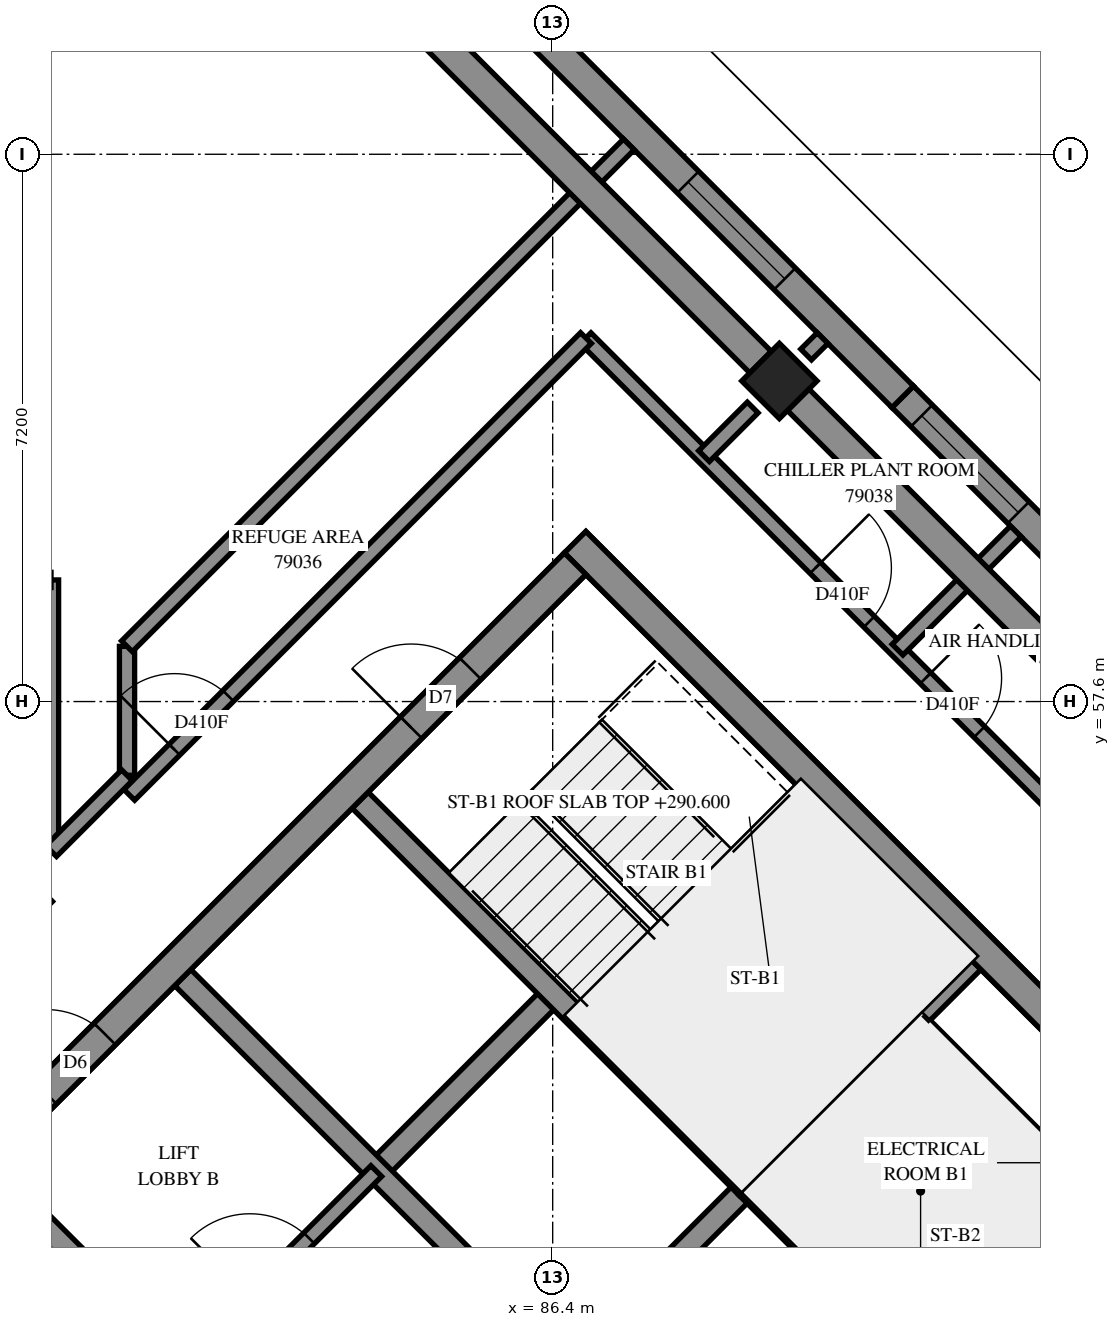
"""IFC4 building model, lengths in metres.
Left out: names, types, materials, properties, quantities, classifications, styles, units other than length and angle.
Written with IfcOpenShell. Run it as: python <this file> out.ifc"""

import sys

from ifc_helpers import new_model, si_unit, direction, frame, frame_2d, origin, origin_2d, place, context, subcontext, project, spatial, polyline, rectangle, outline, extrude, element, fill, save


model = new_model("IFC4")
c1 = context("Model", 3, precision=1e-05, world=origin(), true_north=direction((0.0, 1.0)))
c2 = subcontext(c1, "Body", "Model", "MODEL_VIEW")
j1 = project(units=[si_unit("LENGTHUNIT", "METRE"), si_unit("PLANEANGLEUNIT", "RADIAN")], contexts=[c1])
p1 = place(None, origin())
s1 = spatial("IfcSite", under=j1, at=p1, CompositionType="ELEMENT")
p2 = place(p1, origin())
s2 = spatial("IfcBuilding", under=s1, at=p2, CompositionType="ELEMENT")
p3 = place(p2, frame((0.0, 0.0, 290.6)))
s3 = spatial("IfcBuildingStorey", under=s2, at=p3, CompositionType="ELEMENT", Elevation=290.6)
p4 = place(p3, frame((89.382, 61.818, 0.0), z_axis=(0.0, 0.0, 1.0), x_axis=(0.7071067812, -0.7071067812, 0.0)))
e1 = element("IfcColumn", 1, at=p4, inside=s3, PredefinedType="COLUMN", context=c2, shape_type="SweptSolid", body=[
    extrude(rectangle(XDim=0.7, YDim=0.7, at=origin_2d()), origin(), (0.0, 0.0, 1.0), 3.5),
])
p5 = place(p3, frame((86.695, 59.696, -0.3), z_axis=(0.0, 0.0, 1.0), x_axis=(0.7071100706, -0.7071034917, 0.0)))
e2 = element("IfcWall", 2, at=p5, inside=s3, PredefinedType="SHEAR", context=c2, shape_type="SweptSolid", body=[
    extrude(rectangle(XDim=15.2, YDim=0.4, at=frame_2d((7.6, 0.0))), origin(), (0.0, 0.0, 1.0), 3.1),
])
p6 = place(p5, frame((10.4, 0.0, 0.3)))
e3 = element("IfcOpeningElement", 3, at=p6, cuts=e2, PredefinedType="OPENING", context=c2, shape_type="SweptSolid", body=[
    extrude(rectangle(XDim=0.8, YDim=2.1, at=frame_2d((0.4, 1.05))), frame((0.0, 0.21, 0.0), z_axis=(0.0, -1.0, 0.0), x_axis=(1.0, 0.0, 0.0)), (0.0, 0.0, 1.0), 0.42),
])
p7 = place(p3, frame((76.513, 49.231, -0.3), z_axis=(0.0, 0.0, 1.0), x_axis=(0.7071067812, 0.7071067812, 0.0)))
e4 = element("IfcWall", 4, at=p7, inside=s3, PredefinedType="SHEAR", context=c2, shape_type="SweptSolid", body=[
    extrude(rectangle(XDim=14.4, YDim=0.4, at=frame_2d((7.2, 0.0))), origin(), (0.0, 0.0, 1.0), 3.1),
])
p8 = place(p7, frame((4.55, 0.0, 0.3)))
e5 = element("IfcOpeningElement", 5, at=p8, cuts=e4, PredefinedType="OPENING", context=c2, shape_type="SweptSolid", body=[
    extrude(rectangle(XDim=1.1, YDim=2.1, at=frame_2d((0.55, 1.05))), frame((0.0, 0.21, 0.0), z_axis=(0.0, -1.0, 0.0), x_axis=(1.0, 0.0, 0.0)), (0.0, 0.0, 1.0), 0.42),
])
p9 = place(p7, frame((11.35, 0.0, 0.3)))
e6 = element("IfcOpeningElement", 6, at=p9, cuts=e4, PredefinedType="OPENING", context=c2, shape_type="SweptSolid", body=[
    extrude(rectangle(XDim=1.1, YDim=2.1, at=frame_2d((0.55, 1.05))), frame((0.0, 0.21, 0.0), z_axis=(0.0, -1.0, 0.0), x_axis=(1.0, 0.0, 0.0)), (0.0, 0.0, 1.0), 0.42),
])
p10 = place(p3, frame((84.079, 51.423, 0.0), z_axis=(0.0, 0.0, 1.0), x_axis=(0.7071219326, 0.7070916295, 0.0)))
e7 = element("IfcWall", 7, at=p10, inside=s3, PredefinedType="SOLIDWALL", context=c2, shape_type="SweptSolid", body=[
    extrude(rectangle(XDim=3.3, YDim=0.3, at=frame_2d((1.65, 0.0))), origin(), (0.0, 0.0, 1.0), 3.5),
])
p11 = place(p3, frame((86.625, 48.878, 0.0), z_axis=(0.0, 0.0, 1.0), x_axis=(0.7071067812, 0.7071067812, 0.0)))
e8 = element("IfcWall", 8, at=p11, inside=s3, PredefinedType="SOLIDWALL", context=c2, shape_type="SweptSolid", body=[
    extrude(rectangle(XDim=3.3, YDim=0.3, at=frame_2d((1.65, 0.0))), origin(), (0.0, 0.0, 1.0), 3.5),
])
p12 = place(p3, frame((78.988, 51.423, 0.0), z_axis=(0.0, 0.0, 1.0), x_axis=(0.7071067812, -0.7071067812, 0.0)))
e9 = element("IfcWall", 9, at=p12, inside=s3, PredefinedType="SOLIDWALL", context=c2, shape_type="SweptSolid", body=[
    extrude(rectangle(XDim=14.4, YDim=0.3, at=frame_2d((7.2, 0.0))), origin(), (0.0, 0.0, 1.0), 3.5),
])
p13 = place(p12, frame((12.05, 0.0, 0.0)))
e10 = element("IfcOpeningElement", 10, at=p13, cuts=e9, PredefinedType="OPENING", context=c2, shape_type="SweptSolid", body=[
    extrude(rectangle(XDim=1.1, YDim=2.1, at=frame_2d((0.55, 1.05))), frame((0.0, 0.16, 0.0), z_axis=(0.0, -1.0, 0.0), x_axis=(1.0, 0.0, 0.0)), (0.0, 0.0, 1.0), 0.32),
])
p14 = place(p3, frame((81.534, 53.969, 0.0), z_axis=(0.0, 0.0, 1.0), x_axis=(0.707103309, -0.7071102534, 0.0)))
e11 = element("IfcWall", 11, at=p14, inside=s3, PredefinedType="SOLIDWALL", context=c2, shape_type="SweptSolid", body=[
    extrude(rectangle(XDim=14.4, YDim=0.3, at=frame_2d((7.2, 0.0))), origin(), (0.0, 0.0, 1.0), 3.5),
])
p15 = place(p14, frame((12.05, 0.0, 0.0)))
e12 = element("IfcOpeningElement", 12, at=p15, cuts=e11, PredefinedType="OPENING", context=c2, shape_type="SweptSolid", body=[
    extrude(rectangle(XDim=1.1, YDim=2.1, at=frame_2d((0.55, 1.05))), frame((0.0, 0.16, 0.0), z_axis=(0.0, -1.0, 0.0), x_axis=(1.0, 0.0, 0.0)), (0.0, 0.0, 1.0), 0.32),
])
for number, where, z_axis, x_axis in (
    (13, (83.867, 56.302, 0.0), (0.0, 0.0, 1.0), (0.707, -0.707, 0.0)),
    (14, (88.958, 51.211, 0.0), (0.0, 0.0, 1.0), (0.707, -0.707, 0.0)),
):
    element("IfcWall", number, at=place(p3, frame(where, z_axis=z_axis, x_axis=x_axis)), inside=s3, PredefinedType="SOLIDWALL", context=c2, shape_type="SweptSolid", body=[
        extrude(rectangle(XDim=7.2, YDim=0.3, at=frame_2d((3.6, 0.0))), origin(), (0.0, 0.0, 1.0), 3.5),
    ])
p16 = place(p3, frame((88.958, 51.211, 0.0), z_axis=(0.0, 0.0, 1.0), x_axis=(0.7071067812, 0.7071067812, 0.0)))
e15 = element("IfcWall", 15, at=p16, inside=s3, PredefinedType="SOLIDWALL", context=c2, shape_type="SweptSolid", body=[
    extrude(rectangle(XDim=4.2, YDim=0.3, at=frame_2d((2.1, 0.0))), origin(), (0.0, 0.0, 1.0), 3.5),
])
p17 = place(p3, frame((95.73, 56.884, 0.0), z_axis=(0.0, 0.0, 1.0), x_axis=(-0.7071067812, 0.7071067812, 0.0)))
e16 = element("IfcWall", 16, at=p17, inside=s3, PredefinedType="SOLIDWALL", context=c2, shape_type="SweptSolid", body=[
    extrude(outline(polyline([(0.0, -0.2), (6.682, -0.2), (6.682, 0.2), (0.0, 0.2), (0.0, -0.2)])), origin(), (0.0, 0.0, 1.0), 3.5),
])
p18 = place(p17, frame((1.677, 0.0, 0.7)))
e17 = element("IfcOpeningElement", 17, at=p18, cuts=e16, PredefinedType="OPENING", context=c2, shape_type="SweptSolid", body=[
    extrude(rectangle(XDim=1.8, YDim=2.2, at=frame_2d((0.9, 1.1))), frame((0.0, 0.21, 0.0), z_axis=(0.0, -1.0, 0.0), x_axis=(1.0, 0.0, 0.0)), (0.0, 0.0, 1.0), 0.42),
])
p19 = place(p17, frame((4.529, 0.0, 0.7)))
e18 = element("IfcOpeningElement", 18, at=p19, cuts=e16, PredefinedType="OPENING", context=c2, shape_type="SweptSolid", body=[
    extrude(rectangle(XDim=1.8, YDim=2.2, at=frame_2d((0.9, 1.1))), frame((0.0, 0.21, 0.0), z_axis=(0.0, -1.0, 0.0), x_axis=(1.0, 0.0, 0.0)), (0.0, 0.0, 1.0), 0.42),
])
p20 = place(p3, frame((91.005, 61.609, 0.0), z_axis=(0.0, 0.0, 1.0), x_axis=(-0.7071142638, 0.7070992985, 0.0)))
e19 = element("IfcWall", 19, at=p20, inside=s3, PredefinedType="SOLIDWALL", context=c2, shape_type="SweptSolid", body=[
    extrude(outline(polyline([(0.0, -0.2), (6.682, -0.2), (6.682, 0.2), (0.0, 0.2), (0.0, -0.2)])), origin(), (0.0, 0.0, 1.0), 3.5),
])
p21 = place(p20, frame((2.195, 0.0, 0.7)))
e20 = element("IfcOpeningElement", 20, at=p21, cuts=e19, PredefinedType="OPENING", context=c2, shape_type="SweptSolid", body=[
    extrude(rectangle(XDim=1.8, YDim=2.2, at=frame_2d((0.9, 1.1))), frame((0.0, 0.21, 0.0), z_axis=(0.0, -1.0, 0.0), x_axis=(1.0, 0.0, 0.0)), (0.0, 0.0, 1.0), 0.42),
])
p22 = place(p3, frame((91.313, 53.354, 0.0), z_axis=(0.0, 0.0, 1.0), x_axis=(0.7071147811, -0.7070987812, 0.0)))
e21 = element("IfcWall", 21, at=p22, inside=s3, PredefinedType="PARTITIONING", context=c2, shape_type="SweptSolid", body=[
    extrude(rectangle(XDim=6.25, YDim=0.15, at=frame_2d((3.125, 0.0))), origin(), (0.0, 0.0, 1.0), 3.5),
])
p23 = place(p3, frame((81.534, 48.878, 0.0), z_axis=(0.0, 0.0, 1.0), x_axis=(0.707092892, 0.7071206701, 0.0)))
e22 = element("IfcWall", 22, at=p23, inside=s3, PredefinedType="PARTITIONING", context=c2, shape_type="SweptSolid", body=[
    extrude(rectangle(XDim=3.6, YDim=0.2, at=frame_2d((1.8, 0.0))), origin(), (0.0, 0.0, 1.0), 3.5),
])
p24 = place(p23, frame((1.25, 0.0, 0.0)))
e23 = element("IfcOpeningElement", 23, at=p24, cuts=e22, PredefinedType="OPENING", context=c2, shape_type="SweptSolid", body=[
    extrude(rectangle(XDim=1.1, YDim=2.1, at=frame_2d((0.55, 1.05))), frame((0.0, 0.11, 0.0), z_axis=(0.0, -1.0, 0.0), x_axis=(1.0, 0.0, 0.0)), (0.0, 0.0, 1.0), 0.22),
])
p25 = place(p3, frame((86.833, 62.381, 0.0), z_axis=(0.0, 0.0, 1.0), x_axis=(0.7071067812, -0.7071067812, 0.0)))
e24 = element("IfcWall", 24, at=p25, inside=s3, PredefinedType="PARTITIONING", context=c2, shape_type="SweptSolid", body=[
    extrude(rectangle(XDim=18.801, YDim=0.2, at=frame_2d((9.4, 0.0))), origin(), (0.0, 0.0, 1.0), 3.5),
])
p26 = place(p25, frame((4.276, 0.0, 0.0)))
e25 = element("IfcOpeningElement", 25, at=p26, cuts=e24, PredefinedType="OPENING", context=c2, shape_type="SweptSolid", body=[
    extrude(rectangle(XDim=1.0, YDim=2.1, at=frame_2d((0.5, 1.05))), frame((0.0, 0.11, 0.0), z_axis=(0.0, -1.0, 0.0), x_axis=(1.0, 0.0, 0.0)), (0.0, 0.0, 1.0), 0.22),
])
p27 = place(p25, frame((6.326, 0.0, 0.0)))
e26 = element("IfcOpeningElement", 26, at=p27, cuts=e24, PredefinedType="OPENING", context=c2, shape_type="SweptSolid", body=[
    extrude(rectangle(XDim=1.0, YDim=2.1, at=frame_2d((0.5, 1.05))), frame((0.0, 0.11, 0.0), z_axis=(0.0, -1.0, 0.0), x_axis=(1.0, 0.0, 0.0)), (0.0, 0.0, 1.0), 0.22),
])
p28 = place(p25, frame((11.476, 0.0, 0.0)))
e27 = element("IfcOpeningElement", 27, at=p28, cuts=e24, PredefinedType="OPENING", context=c2, shape_type="SweptSolid", body=[
    extrude(rectangle(XDim=1.0, YDim=2.1, at=frame_2d((0.5, 1.05))), frame((0.0, 0.11, 0.0), z_axis=(0.0, -1.0, 0.0), x_axis=(1.0, 0.0, 0.0)), (0.0, 0.0, 1.0), 0.22),
])
p29 = place(p25, frame((13.526, 0.0, 0.0)))
e28 = element("IfcOpeningElement", 28, at=p29, cuts=e24, PredefinedType="OPENING", context=c2, shape_type="SweptSolid", body=[
    extrude(rectangle(XDim=1.0, YDim=2.1, at=frame_2d((0.5, 1.05))), frame((0.0, 0.11, 0.0), z_axis=(0.0, -1.0, 0.0), x_axis=(1.0, 0.0, 0.0)), (0.0, 0.0, 1.0), 0.22),
])
p30 = place(p3, frame((80.83, 56.372, 0.0), z_axis=(0.0, 0.0, 1.0), x_axis=(0.7069890968, 0.707224446, 0.0)))
e29 = element("IfcWall", 29, at=p30, inside=s3, PredefinedType="PARTITIONING", context=c2, shape_type="SweptSolid", body=[
    extrude(rectangle(XDim=8.498, YDim=0.2, at=frame_2d((4.249, 0.0))), origin(), (0.0, 0.0, 1.0), 3.5),
])
p31 = place(p30, frame((0.841, 0.0, 0.0)))
e30 = element("IfcOpeningElement", 30, at=p31, cuts=e29, PredefinedType="OPENING", context=c2, shape_type="SweptSolid", body=[
    extrude(rectangle(XDim=1.0, YDim=2.1, at=frame_2d((0.5, 1.05))), frame((0.0, 0.11, 0.0), z_axis=(0.0, -1.0, 0.0), x_axis=(1.0, 0.0, 0.0)), (0.0, 0.0, 1.0), 0.22),
])
p32 = place(p3, frame((79.8, 55.632, 0.0), z_axis=(0.0, 0.0, 1.0), x_axis=(0.0, 1.0, 0.0)))
e31 = element("IfcWall", 31, at=p32, inside=s3, PredefinedType="PARTITIONING", context=c2, shape_type="SweptSolid", body=[
    extrude(rectangle(XDim=3.568, YDim=0.2, at=frame_2d((1.784, 0.0))), origin(), (0.0, 0.0, 1.0), 3.5),
])
p33 = place(p3, frame((80.8, 56.63, 0.0), z_axis=(0.0, 0.0, 1.0), x_axis=(0.0, 1.0, 0.0)))
e32 = element("IfcWall", 32, at=p33, inside=s3, PredefinedType="PARTITIONING", context=c2, shape_type="SweptSolid", body=[
    extrude(rectangle(XDim=1.696, YDim=0.2, at=frame_2d((0.848, 0.0))), origin(), (0.0, 0.0, 1.0), 3.5),
])
p34 = place(p3, frame((79.802, 55.633, 0.0), z_axis=(0.0, 0.0, 1.0), x_axis=(0.7071067812, 0.7071067812, 0.0)))
e33 = element("IfcWall", 33, at=p34, inside=s3, PredefinedType="PARTITIONING", context=c2, shape_type="SweptSolid", body=[
    extrude(rectangle(XDim=1.411, YDim=0.2, at=frame_2d((0.706, 0.0))), origin(), (0.0, 0.0, 1.0), 3.5),
])
p35 = place(p3, frame((88.391, 60.828, 0.0), z_axis=(0.0, 0.0, 1.0), x_axis=(0.7071067812, 0.7071067812, 0.0)))
e34 = element("IfcWall", 34, at=p35, inside=s3, PredefinedType="PARTITIONING", context=c2, shape_type="SweptSolid", body=[
    extrude(rectangle(XDim=0.905, YDim=0.2, at=frame_2d((0.453, 0.0))), origin(), (0.0, 0.0, 1.0), 3.5),
])
p36 = place(p3, frame((80.799, 58.327, 0.0), z_axis=(0.0, 0.0, 1.0), x_axis=(0.7071067812, 0.7071067812, 0.0)))
e35 = element("IfcWall", 35, at=p36, inside=s3, PredefinedType="PARTITIONING", context=c2, shape_type="SweptSolid", body=[
    extrude(outline(polyline([(0.0, -0.1), (9.338, -0.1), (9.338, 0.1), (0.0, 0.1), (0.0, -0.1)])), origin(), (0.0, 0.0, 1.0), 3.5),
])
p37 = place(p3, frame((90.937, 58.283, 0.0), z_axis=(0.0, 0.0, 1.0), x_axis=(0.7071067812, 0.7071067812, 0.0)))
e36 = element("IfcWall", 36, at=p37, inside=s3, PredefinedType="PARTITIONING", context=c2, shape_type="SweptSolid", body=[
    extrude(outline(polyline([(0.0, -0.1), (2.2, -0.1), (2.2, 0.1), (0.0, 0.1), (0.0, -0.1)])), origin(), (0.0, 0.0, 1.0), 3.5),
])
p38 = place(p3, frame((89.734, 62.166, 0.0), z_axis=(0.0, 0.0, 1.0), x_axis=(0.7089070674, 0.7053018997, 0.0)))
e37 = element("IfcWall", 37, at=p38, inside=s3, PredefinedType="PARTITIONING", context=c2, shape_type="SweptSolid", body=[
    extrude(outline(polyline([(0.0, -0.1), (0.305, -0.1), (0.305, 0.1), (0.0, 0.1), (0.0, -0.1)])), origin(), (0.0, 0.0, 1.0), 3.5),
])
p39 = place(p19, origin())
e38 = element("IfcWindow", 38, at=p39, inside=s3, PartitioningType="SINGLE_PANEL", PredefinedType="WINDOW", context=c2, shape_type="SweptSolid", body=[
    extrude(rectangle(XDim=1.8, YDim=2.2, at=frame_2d((0.9, 1.1))), frame((0.0, 0.08, 0.0), z_axis=(0.0, -1.0, 0.0), x_axis=(1.0, 0.0, 0.0)), (0.0, 0.0, 1.0), 0.06),
])
fill(e18, e38)
p40 = place(p21, origin())
e39 = element("IfcWindow", 39, at=p40, inside=s3, PartitioningType="SINGLE_PANEL", PredefinedType="WINDOW", context=c2, shape_type="SweptSolid", body=[
    extrude(rectangle(XDim=1.8, YDim=2.2, at=frame_2d((0.9, 1.1))), frame((0.0, 0.08, 0.0), z_axis=(0.0, -1.0, 0.0), x_axis=(1.0, 0.0, 0.0)), (0.0, 0.0, 1.0), 0.06),
])
fill(e20, e39)
p41 = place(p8, origin())
e40 = element("IfcDoor", 40, at=p41, inside=s3, OperationType="DOUBLE_DOOR_SINGLE_SWING", PredefinedType="DOOR", context=c2, shape_type="SweptSolid", body=[
    extrude(rectangle(XDim=1.1, YDim=2.1, at=frame_2d((0.55, 1.05))), frame((0.0, 0.025, 0.0), z_axis=(0.0, -1.0, 0.0), x_axis=(1.0, 0.0, 0.0)), (0.0, 0.0, 1.0), 0.05),
])
fill(e5, e40)
p42 = place(p9, origin())
e41 = element("IfcDoor", 41, at=p42, inside=s3, OperationType="SINGLE_SWING_LEFT", PredefinedType="DOOR", context=c2, shape_type="SweptSolid", body=[
    extrude(rectangle(XDim=1.1, YDim=2.1, at=frame_2d((0.55, 1.05))), frame((0.0, 0.025, 0.0), z_axis=(0.0, -1.0, 0.0), x_axis=(1.0, 0.0, 0.0)), (0.0, 0.0, 1.0), 0.05),
])
fill(e6, e41)
p43 = place(p24, origin())
e42 = element("IfcDoor", 42, at=p43, inside=s3, OperationType="DOUBLE_DOOR_SINGLE_SWING", PredefinedType="DOOR", context=c2, shape_type="SweptSolid", body=[
    extrude(rectangle(XDim=1.1, YDim=2.1, at=frame_2d((0.55, 1.05))), frame((0.0, 0.025, 0.0), z_axis=(0.0, -1.0, 0.0), x_axis=(1.0, 0.0, 0.0)), (0.0, 0.0, 1.0), 0.05),
])
fill(e23, e42)
p44 = place(p31, origin())
e43 = element("IfcDoor", 43, at=p44, inside=s3, OperationType="SINGLE_SWING_RIGHT", PredefinedType="DOOR", context=c2, shape_type="SweptSolid", body=[
    extrude(rectangle(XDim=1.0, YDim=2.1, at=frame_2d((0.5, 1.05))), frame((0.0, 0.025, 0.0), z_axis=(0.0, -1.0, 0.0), x_axis=(1.0, 0.0, 0.0)), (0.0, 0.0, 1.0), 0.05),
])
fill(e30, e43)
p45 = place(p26, origin())
e44 = element("IfcDoor", 44, at=p45, inside=s3, OperationType="SINGLE_SWING_LEFT", PredefinedType="DOOR", context=c2, shape_type="SweptSolid", body=[
    extrude(rectangle(XDim=1.0, YDim=2.1, at=frame_2d((0.5, 1.05))), frame((0.0, 0.025, 0.0), z_axis=(0.0, -1.0, 0.0), x_axis=(1.0, 0.0, 0.0)), (0.0, 0.0, 1.0), 0.05),
])
fill(e25, e44)
p46 = place(p27, origin())
e45 = element("IfcDoor", 45, at=p46, inside=s3, OperationType="SINGLE_SWING_RIGHT", PredefinedType="DOOR", context=c2, shape_type="SweptSolid", body=[
    extrude(rectangle(XDim=1.0, YDim=2.1, at=frame_2d((0.5, 1.05))), frame((0.0, 0.025, 0.0), z_axis=(0.0, -1.0, 0.0), x_axis=(1.0, 0.0, 0.0)), (0.0, 0.0, 1.0), 0.05),
])
fill(e26, e45)
save(model, sys.argv[1])
